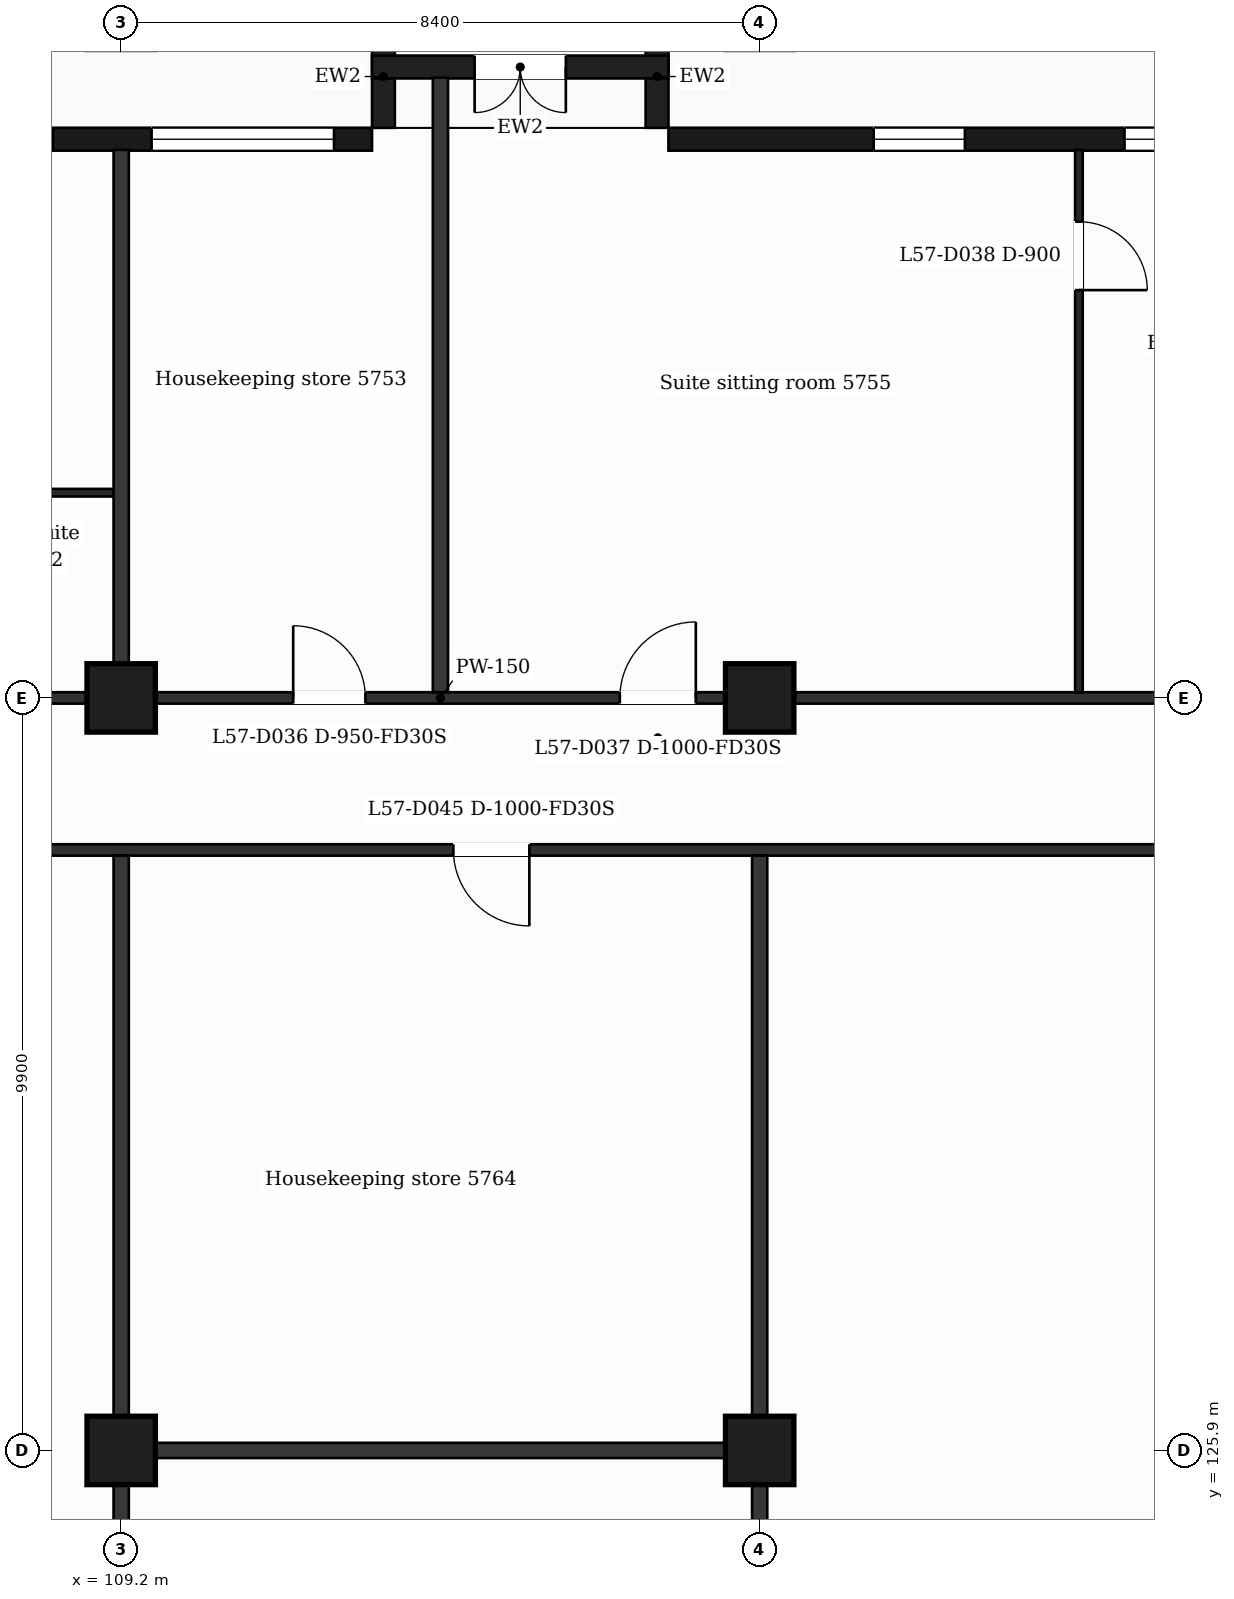
"""IFC4 building model, lengths in metres.
Left out: names, types, materials, properties, quantities, classifications, styles, units other than length and angle.
Written with IfcOpenShell. Run it as: python <this file> out.ifc"""

import sys

from ifc_helpers import new_model, si_unit, direction, frame, frame_2d, origin, origin_2d, place, context, subcontext, project, spatial, rectangle, extrude, element, fill, save


model = new_model("IFC4")
c1 = context("Model", 3, precision=1e-05, world=origin(), true_north=direction((0.0, 1.0)))
c2 = subcontext(c1, "Body", "Model", "MODEL_VIEW")
j1 = project(units=[si_unit("LENGTHUNIT", "METRE"), si_unit("PLANEANGLEUNIT", "RADIAN")], contexts=[c1])
p1 = place(None, origin())
s1 = spatial("IfcSite", under=j1, at=p1, CompositionType="ELEMENT")
p2 = place(p1, origin())
s2 = spatial("IfcBuilding", under=s1, at=p2, CompositionType="ELEMENT")
p3 = place(p2, frame((0.0, 0.0, 235.5)))
s3 = spatial("IfcBuildingStorey", under=s2, at=p3, CompositionType="ELEMENT", Elevation=235.5)
for number, where, z_axis, x_axis in (
    (1, (109.2, 125.9, 0.0), (0.0, 0.0, 1.0), (1.0, 0.0, 0.0)),
    (2, (117.6, 125.9, 0.0), (0.0, 0.0, 1.0), (1.0, 0.0, 0.0)),
    (3, (109.2, 135.8, 0.0), (0.0, 0.0, 1.0), (1.0, 0.0, 0.0)),
    (4, (117.6, 135.8, 0.0), (0.0, 0.0, 1.0), (1.0, 0.0, 0.0)),
):
    element("IfcColumn", number, at=place(p3, frame(where, z_axis=z_axis, x_axis=x_axis)), inside=s3, PredefinedType="COLUMN", context=c2, shape_type="SweptSolid", body=[
        extrude(rectangle(XDim=0.9, YDim=0.9, at=origin_2d()), origin(), (0.0, 0.0, 1.0), 3.7),
    ])
p4 = place(p3, frame((130.65, 143.15, 0.0), z_axis=(0.0, 0.0, 1.0), x_axis=(-1.0, 0.0, 0.0)))
e5 = element("IfcWall", 5, at=p4, inside=s3, PredefinedType="SOLIDWALL", context=c2, shape_type="SweptSolid", body=[
    extrude(rectangle(XDim=14.25, YDim=0.3, at=frame_2d((7.125, 0.0))), origin(), (0.0, 0.0, 1.0), 3.38),
])
p5 = place(p4, frame((1.35, 0.0, 0.9)))
e6 = element("IfcOpeningElement", 6, at=p5, cuts=e5, PredefinedType="OPENING", context=c2, shape_type="SweptSolid", body=[
    extrude(rectangle(XDim=2.4, YDim=2.1, at=frame_2d((1.2, 1.05))), frame((0.0, 0.16, 0.0), z_axis=(0.0, -1.0, 0.0), x_axis=(1.0, 0.0, 0.0)), (0.0, 0.0, 1.0), 0.32),
])
p6 = place(p4, frame((5.25, 0.0, 0.0)))
e7 = element("IfcOpeningElement", 7, at=p6, cuts=e5, PredefinedType="OPENING", context=c2, shape_type="SweptSolid", body=[
    extrude(rectangle(XDim=1.2, YDim=2.4, at=frame_2d((0.6, 1.2))), frame((0.0, 0.16, 0.0), z_axis=(0.0, -1.0, 0.0), x_axis=(1.0, 0.0, 0.0)), (0.0, 0.0, 1.0), 0.32),
])
p7 = place(p4, frame((7.05, 0.0, 0.9)))
e8 = element("IfcOpeningElement", 8, at=p7, cuts=e5, PredefinedType="OPENING", context=c2, shape_type="SweptSolid", body=[
    extrude(rectangle(XDim=1.2, YDim=2.1, at=frame_2d((0.6, 1.05))), frame((0.0, 0.16, 0.0), z_axis=(0.0, -1.0, 0.0), x_axis=(1.0, 0.0, 0.0)), (0.0, 0.0, 1.0), 0.32),
])
p8 = place(p4, frame((10.35, 0.0, 0.9)))
e9 = element("IfcOpeningElement", 9, at=p8, cuts=e5, PredefinedType="OPENING", context=c2, shape_type="SweptSolid", body=[
    extrude(rectangle(XDim=1.2, YDim=2.1, at=frame_2d((0.6, 1.05))), frame((0.0, 0.16, 0.0), z_axis=(0.0, -1.0, 0.0), x_axis=(1.0, 0.0, 0.0)), (0.0, 0.0, 1.0), 0.32),
])
p9 = place(p3, frame((112.5, 143.15, 0.0), z_axis=(0.0, 0.0, 1.0), x_axis=(-1.0, 0.0, 0.0)))
e10 = element("IfcWall", 10, at=p9, inside=s3, PredefinedType="SOLIDWALL", context=c2, shape_type="SweptSolid", body=[
    extrude(rectangle(XDim=16.5, YDim=0.3, at=frame_2d((8.25, 0.0))), origin(), (0.0, 0.0, 1.0), 3.38),
])
p10 = place(p9, frame((0.5, 0.0, 0.9)))
e11 = element("IfcOpeningElement", 11, at=p10, cuts=e10, PredefinedType="OPENING", context=c2, shape_type="SweptSolid", body=[
    extrude(rectangle(XDim=2.4, YDim=2.1, at=frame_2d((1.2, 1.05))), frame((0.0, 0.16, 0.0), z_axis=(0.0, -1.0, 0.0), x_axis=(1.0, 0.0, 0.0)), (0.0, 0.0, 1.0), 0.32),
])
p11 = place(p9, frame((4.2, 0.0, 0.9)))
e12 = element("IfcOpeningElement", 12, at=p11, cuts=e10, PredefinedType="OPENING", context=c2, shape_type="SweptSolid", body=[
    extrude(rectangle(XDim=2.4, YDim=2.1, at=frame_2d((1.2, 1.05))), frame((0.0, 0.16, 0.0), z_axis=(0.0, -1.0, 0.0), x_axis=(1.0, 0.0, 0.0)), (0.0, 0.0, 1.0), 0.32),
])
p12 = place(p9, frame((9.0, 0.0, 0.0)))
e13 = element("IfcOpeningElement", 13, at=p12, cuts=e10, PredefinedType="OPENING", context=c2, shape_type="SweptSolid", body=[
    extrude(rectangle(XDim=1.2, YDim=2.4, at=frame_2d((0.6, 1.2))), frame((0.0, 0.16, 0.0), z_axis=(0.0, -1.0, 0.0), x_axis=(1.0, 0.0, 0.0)), (0.0, 0.0, 1.0), 0.32),
])
p13 = place(p9, frame((12.6, 0.0, 0.9)))
e14 = element("IfcOpeningElement", 14, at=p13, cuts=e10, PredefinedType="OPENING", context=c2, shape_type="SweptSolid", body=[
    extrude(rectangle(XDim=2.4, YDim=2.1, at=frame_2d((1.2, 1.05))), frame((0.0, 0.16, 0.0), z_axis=(0.0, -1.0, 0.0), x_axis=(1.0, 0.0, 0.0)), (0.0, 0.0, 1.0), 0.32),
])
for number, where, z_axis, x_axis in (
    (15, (116.25, 143.3, 0.0), (0.0, 0.0, 1.0), (0.0, 1.0, 0.0)),
    (16, (112.65, 143.3, 0.0), (0.0, 0.0, 1.0), (0.0, 1.0, 0.0)),
):
    element("IfcWall", number, at=place(p3, frame(where, z_axis=z_axis, x_axis=x_axis)), inside=s3, PredefinedType="SOLIDWALL", context=c2, shape_type="SweptSolid", body=[
        extrude(rectangle(XDim=1.35, YDim=0.3, at=frame_2d((0.675, 0.0))), origin(), (0.0, 0.0, 1.0), 3.38),
    ])
p14 = place(p3, frame((116.4, 144.1, 0.0), z_axis=(0.0, 0.0, 1.0), x_axis=(-1.0, 0.0, 0.0)))
e17 = element("IfcWall", 17, at=p14, inside=s3, PredefinedType="SOLIDWALL", context=c2, shape_type="SweptSolid", body=[
    extrude(rectangle(XDim=3.9, YDim=0.3, at=frame_2d((1.95, 0.0))), origin(), (0.0, 0.0, 1.0), 3.38),
])
p15 = place(p14, frame((1.35, 0.0, 0.0)))
e18 = element("IfcOpeningElement", 18, at=p15, cuts=e17, PredefinedType="OPENING", context=c2, shape_type="SweptSolid", body=[
    extrude(rectangle(XDim=1.2, YDim=2.4, at=frame_2d((0.6, 1.2))), frame((0.0, 0.16, 0.0), z_axis=(0.0, -1.0, 0.0), x_axis=(1.0, 0.0, 0.0)), (0.0, 0.0, 1.0), 0.32),
])
p16 = place(p3, frame((109.2, 125.9, 0.0), z_axis=(0.0, 0.0, 1.0), x_axis=(1.0, 0.0, 0.0)))
e19 = element("IfcWall", 19, at=p16, inside=s3, PredefinedType="PARTITIONING", context=c2, shape_type="SweptSolid", body=[
    extrude(rectangle(XDim=8.4, YDim=0.2, at=frame_2d((4.2, 0.0))), origin(), (0.0, 0.0, 1.0), 3.38),
])
p17 = place(p3, frame((100.725, 133.8, 0.0), z_axis=(0.0, 0.0, 1.0), x_axis=(1.0, 0.0, 0.0)))
e20 = element("IfcWall", 20, at=p17, inside=s3, PredefinedType="PARTITIONING", context=c2, shape_type="SweptSolid", body=[
    extrude(rectangle(XDim=25.35, YDim=0.15, at=frame_2d((12.675, 0.0))), origin(), (0.0, 0.0, 1.0), 3.38),
])
p18 = place(p17, frame((12.845, 0.0, 0.0)))
e21 = element("IfcOpeningElement", 21, at=p18, cuts=e20, PredefinedType="OPENING", context=c2, shape_type="SweptSolid", body=[
    extrude(rectangle(XDim=1.0, YDim=2.1, at=frame_2d((0.5, 1.05))), frame((0.0, 0.085, 0.0), z_axis=(0.0, -1.0, 0.0), x_axis=(1.0, 0.0, 0.0)), (0.0, 0.0, 1.0), 0.17),
])
p19 = place(p3, frame((90.895, 135.8, 0.0), z_axis=(0.0, 0.0, 1.0), x_axis=(1.0, 0.0, 0.0)))
e22 = element("IfcWall", 22, at=p19, inside=s3, PredefinedType="PARTITIONING", context=c2, shape_type="SweptSolid", body=[
    extrude(rectangle(XDim=45.011, YDim=0.15, at=frame_2d((22.505, 0.0))), origin(), (0.0, 0.0, 1.0), 3.38),
])
p20 = place(p19, frame((7.675, 0.0, 0.0)))
e23 = element("IfcOpeningElement", 23, at=p20, cuts=e22, PredefinedType="OPENING", context=c2, shape_type="SweptSolid", body=[
    extrude(rectangle(XDim=1.0, YDim=2.1, at=frame_2d((0.5, 1.05))), frame((0.0, 0.085, 0.0), z_axis=(0.0, -1.0, 0.0), x_axis=(1.0, 0.0, 0.0)), (0.0, 0.0, 1.0), 0.17),
])
p21 = place(p19, frame((12.58, 0.0, 0.0)))
e24 = element("IfcOpeningElement", 24, at=p21, cuts=e22, PredefinedType="OPENING", context=c2, shape_type="SweptSolid", body=[
    extrude(rectangle(XDim=0.95, YDim=2.1, at=frame_2d((0.475, 1.05))), frame((0.0, 0.085, 0.0), z_axis=(0.0, -1.0, 0.0), x_axis=(1.0, 0.0, 0.0)), (0.0, 0.0, 1.0), 0.17),
])
p22 = place(p19, frame((20.568, 0.0, 0.0)))
e25 = element("IfcOpeningElement", 25, at=p22, cuts=e22, PredefinedType="OPENING", context=c2, shape_type="SweptSolid", body=[
    extrude(rectangle(XDim=0.95, YDim=2.1, at=frame_2d((0.475, 1.05))), frame((0.0, 0.085, 0.0), z_axis=(0.0, -1.0, 0.0), x_axis=(1.0, 0.0, 0.0)), (0.0, 0.0, 1.0), 0.17),
])
p23 = place(p19, frame((24.865, 0.0, 0.0)))
e26 = element("IfcOpeningElement", 26, at=p23, cuts=e22, PredefinedType="OPENING", context=c2, shape_type="SweptSolid", body=[
    extrude(rectangle(XDim=1.0, YDim=2.1, at=frame_2d((0.5, 1.05))), frame((0.0, 0.085, 0.0), z_axis=(0.0, -1.0, 0.0), x_axis=(1.0, 0.0, 0.0)), (0.0, 0.0, 1.0), 0.17),
])
p24 = place(p19, frame((37.195, 0.0, 0.0)))
e27 = element("IfcOpeningElement", 27, at=p24, cuts=e22, PredefinedType="OPENING", context=c2, shape_type="SweptSolid", body=[
    extrude(rectangle(XDim=1.0, YDim=2.1, at=frame_2d((0.5, 1.05))), frame((0.0, 0.085, 0.0), z_axis=(0.0, -1.0, 0.0), x_axis=(1.0, 0.0, 0.0)), (0.0, 0.0, 1.0), 0.17),
])
p25 = place(p3, frame((107.05, 138.5, 0.0), z_axis=(0.0, 0.0, 1.0), x_axis=(1.0, 0.0, 0.0)))
e28 = element("IfcWall", 28, at=p25, inside=s3, PredefinedType="PARTITIONING", context=c2, shape_type="SweptSolid", body=[
    extrude(rectangle(XDim=2.15, YDim=0.1, at=frame_2d((1.075, 0.0))), origin(), (0.0, 0.0, 1.0), 3.38),
])
p26 = place(p3, frame((109.2, 109.075, 0.0), z_axis=(0.0, 0.0, 1.0), x_axis=(0.0, 1.0, 0.0)))
e29 = element("IfcWall", 29, at=p26, inside=s3, PredefinedType="PARTITIONING", context=c2, shape_type="SweptSolid", body=[
    extrude(rectangle(XDim=24.65, YDim=0.2, at=frame_2d((12.325, 0.0))), origin(), (0.0, 0.0, 1.0), 3.38),
])
p27 = place(p3, frame((109.2, 135.875, 0.0), z_axis=(0.0, 0.0, 1.0), x_axis=(0.0, 1.0, 0.0)))
e30 = element("IfcWall", 30, at=p27, inside=s3, PredefinedType="PARTITIONING", context=c2, shape_type="SweptSolid", body=[
    extrude(rectangle(XDim=7.135, YDim=0.2, at=frame_2d((3.567, 0.0))), origin(), (0.0, 0.0, 1.0), 3.38),
])
p28 = place(p3, frame((113.4, 135.875, 0.0), z_axis=(0.0, 0.0, 1.0), x_axis=(0.0, 1.0, 0.0)))
e31 = element("IfcWall", 31, at=p28, inside=s3, PredefinedType="PARTITIONING", context=c2, shape_type="SweptSolid", body=[
    extrude(rectangle(XDim=8.085, YDim=0.2, at=frame_2d((4.042, 0.0))), origin(), (0.0, 0.0, 1.0), 3.38),
])
p29 = place(p3, frame((117.6, 109.075, 0.0), z_axis=(0.0, 0.0, 1.0), x_axis=(0.0, 1.0, 0.0)))
e32 = element("IfcWall", 32, at=p29, inside=s3, PredefinedType="PARTITIONING", context=c2, shape_type="SweptSolid", body=[
    extrude(rectangle(XDim=24.65, YDim=0.2, at=frame_2d((12.325, 0.0))), origin(), (0.0, 0.0, 1.0), 3.38),
])
p30 = place(p3, frame((121.8, 135.875, 0.0), z_axis=(0.0, 0.0, 1.0), x_axis=(0.0, 1.0, 0.0)))
e33 = element("IfcWall", 33, at=p30, inside=s3, PredefinedType="PARTITIONING", context=c2, shape_type="SweptSolid", body=[
    extrude(rectangle(XDim=7.135, YDim=0.1, at=frame_2d((3.567, 0.0))), origin(), (0.0, 0.0, 1.0), 3.38),
])
p31 = place(p30, frame((5.29, 0.0, 0.0)))
e34 = element("IfcOpeningElement", 34, at=p31, cuts=e33, PredefinedType="OPENING", context=c2, shape_type="SweptSolid", body=[
    extrude(rectangle(XDim=0.9, YDim=2.1, at=frame_2d((0.45, 1.05))), frame((0.0, 0.06, 0.0), z_axis=(0.0, -1.0, 0.0), x_axis=(1.0, 0.0, 0.0)), (0.0, 0.0, 1.0), 0.12),
])
p32 = place(p7, origin())
e35 = element("IfcWindow", 35, at=p32, inside=s3, PartitioningType="SINGLE_PANEL", PredefinedType="WINDOW", context=c2, shape_type="SweptSolid", body=[
    extrude(rectangle(XDim=1.2, YDim=2.1, at=frame_2d((0.6, 1.05))), frame((0.0, 0.03, 0.0), z_axis=(0.0, -1.0, 0.0), x_axis=(1.0, 0.0, 0.0)), (0.0, 0.0, 1.0), 0.06),
])
fill(e8, e35)
p33 = place(p8, origin())
e36 = element("IfcWindow", 36, at=p33, inside=s3, PartitioningType="SINGLE_PANEL", PredefinedType="WINDOW", context=c2, shape_type="SweptSolid", body=[
    extrude(rectangle(XDim=1.2, YDim=2.1, at=frame_2d((0.6, 1.05))), frame((0.0, 0.03, 0.0), z_axis=(0.0, -1.0, 0.0), x_axis=(1.0, 0.0, 0.0)), (0.0, 0.0, 1.0), 0.06),
])
fill(e9, e36)
p34 = place(p10, origin())
e37 = element("IfcWindow", 37, at=p34, inside=s3, PartitioningType="SINGLE_PANEL", PredefinedType="WINDOW", context=c2, shape_type="SweptSolid", body=[
    extrude(rectangle(XDim=2.4, YDim=2.1, at=frame_2d((1.2, 1.05))), frame((0.0, 0.03, 0.0), z_axis=(0.0, -1.0, 0.0), x_axis=(1.0, 0.0, 0.0)), (0.0, 0.0, 1.0), 0.06),
])
fill(e11, e37)
p35 = place(p15, origin())
e38 = element("IfcDoor", 38, at=p35, inside=s3, OperationType="DOUBLE_DOOR_SINGLE_SWING", PredefinedType="DOOR", context=c2, shape_type="SweptSolid", body=[
    extrude(rectangle(XDim=1.2, YDim=2.4, at=frame_2d((0.6, 1.2))), frame((0.0, 0.025, 0.0), z_axis=(0.0, -1.0, 0.0), x_axis=(1.0, 0.0, 0.0)), (0.0, 0.0, 1.0), 0.05),
])
fill(e18, e38)
p36 = place(p22, origin())
e39 = element("IfcDoor", 39, at=p36, inside=s3, OperationType="SINGLE_SWING_LEFT", PredefinedType="DOOR", context=c2, shape_type="SweptSolid", body=[
    extrude(rectangle(XDim=0.95, YDim=2.1, at=frame_2d((0.475, 1.05))), frame((0.0, 0.025, 0.0), z_axis=(0.0, -1.0, 0.0), x_axis=(1.0, 0.0, 0.0)), (0.0, 0.0, 1.0), 0.05),
])
fill(e25, e39)
p37 = place(p23, origin())
e40 = element("IfcDoor", 40, at=p37, inside=s3, OperationType="SINGLE_SWING_RIGHT", PredefinedType="DOOR", context=c2, shape_type="SweptSolid", body=[
    extrude(rectangle(XDim=1.0, YDim=2.1, at=frame_2d((0.5, 1.05))), frame((0.0, 0.025, 0.0), z_axis=(0.0, -1.0, 0.0), x_axis=(1.0, 0.0, 0.0)), (0.0, 0.0, 1.0), 0.05),
])
fill(e26, e40)
p38 = place(p31, origin())
e41 = element("IfcDoor", 41, at=p38, inside=s3, OperationType="SINGLE_SWING_LEFT", PredefinedType="DOOR", context=c2, shape_type="SweptSolid", body=[
    extrude(rectangle(XDim=0.9, YDim=2.1, at=frame_2d((0.45, 1.05))), frame((0.0, 0.025, 0.0), z_axis=(0.0, -1.0, 0.0), x_axis=(1.0, 0.0, 0.0)), (0.0, 0.0, 1.0), 0.05),
])
fill(e34, e41)
p39 = place(p18, origin())
e42 = element("IfcDoor", 42, at=p39, inside=s3, OperationType="SINGLE_SWING_RIGHT", PredefinedType="DOOR", context=c2, shape_type="SweptSolid", body=[
    extrude(rectangle(XDim=1.0, YDim=2.1, at=frame_2d((0.5, 1.05))), frame((0.0, 0.025, 0.0), z_axis=(0.0, -1.0, 0.0), x_axis=(1.0, 0.0, 0.0)), (0.0, 0.0, 1.0), 0.05),
])
fill(e21, e42)
save(model, sys.argv[1])
